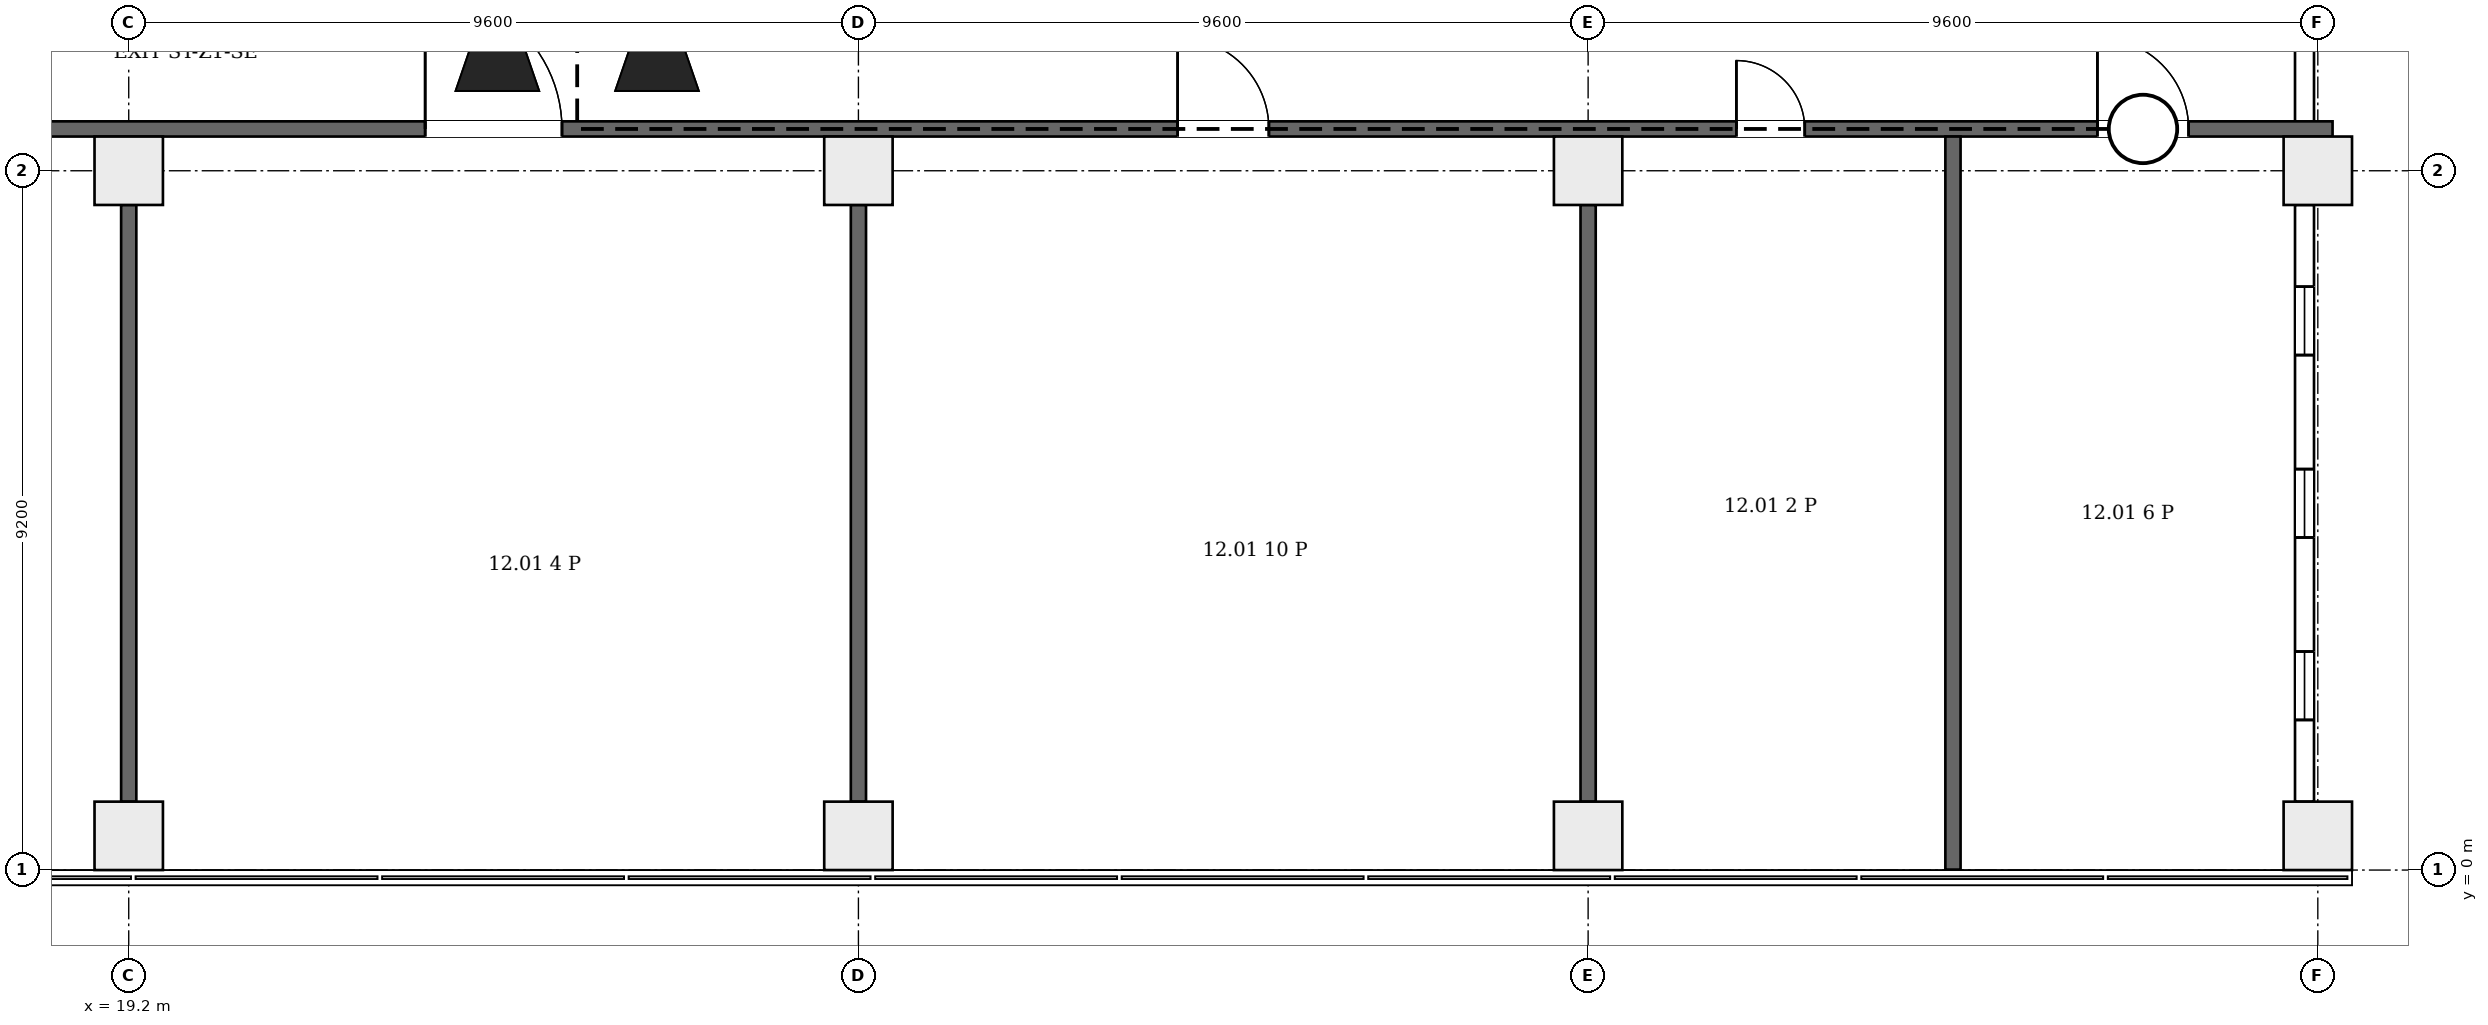
"""IFC4 building model, lengths in metres.
Left out: names, types, materials, properties, quantities, classifications, styles, units other than length and angle.
Written with IfcOpenShell. Run it as: python <this file> out.ifc"""

import sys

from ifc_helpers import new_model, si_unit, direction, frame, frame_2d, origin, origin_2d, place, context, subcontext, project, spatial, rectangle, extrude, element, fill, save


model = new_model("IFC4")
c1 = context("Model", 3, precision=1e-05, world=origin(), true_north=direction((0.0, 1.0)))
c2 = subcontext(c1, "Body", "Model", "MODEL_VIEW")
j1 = project(units=[si_unit("LENGTHUNIT", "METRE"), si_unit("PLANEANGLEUNIT", "RADIAN")], contexts=[c1])
p1 = place(None, origin())
s1 = spatial("IfcSite", under=j1, at=p1, CompositionType="ELEMENT")
p2 = place(p1, origin())
s2 = spatial("IfcBuilding", under=s1, at=p2, CompositionType="ELEMENT")
p3 = place(p2, frame((0.0, 0.0, 61.3)))
s3 = spatial("IfcBuildingStorey", under=s2, at=p3, CompositionType="ELEMENT", Elevation=61.3)
for number, where, z_axis, x_axis in (
    (1, (19.2, 0.45, 0.0), (0.0, 0.0, 1.0), (1.0, 0.0, 0.0)),
    (2, (28.8, 0.45, 0.0), (0.0, 0.0, 1.0), (1.0, 0.0, 0.0)),
    (3, (38.4, 0.45, 0.0), (0.0, 0.0, 1.0), (1.0, 0.0, 0.0)),
    (4, (48.0, 0.45, 0.0), (0.0, 0.0, 1.0), (1.0, 0.0, 0.0)),
    (5, (19.2, 9.2, 0.0), (0.0, 0.0, 1.0), (1.0, 0.0, 0.0)),
    (6, (28.8, 9.2, 0.0), (0.0, 0.0, 1.0), (1.0, 0.0, 0.0)),
    (7, (38.4, 9.2, 0.0), (0.0, 0.0, 1.0), (1.0, 0.0, 0.0)),
    (8, (48.0, 9.2, 0.0), (0.0, 0.0, 1.0), (1.0, 0.0, 0.0)),
):
    element("IfcColumn", number, at=place(p3, frame(where, z_axis=z_axis, x_axis=x_axis)), inside=s3, PredefinedType="COLUMN", context=c2, shape_type="SweptSolid", body=[
        extrude(rectangle(XDim=0.9, YDim=0.9, at=origin_2d()), origin(), (0.0, 0.0, 1.0), 4.2),
    ])
p4 = place(p3, frame((47.825, 0.9, 0.0), z_axis=(0.0, 0.0, 1.0), x_axis=(0.0, 1.0, 0.0)))
e9 = element("IfcWall", 9, at=p4, inside=s3, PredefinedType="ELEMENTEDWALL", context=c2, shape_type="SweptSolid", body=[
    extrude(rectangle(XDim=7.85, YDim=0.25, at=frame_2d((3.925, 0.0))), origin(), (0.0, 0.0, 1.0), 3.3),
])
p5 = place(p4, frame((1.075, 0.0, 0.6)))
e10 = element("IfcOpeningElement", 10, at=p5, cuts=e9, PredefinedType="OPENING", context=c2, shape_type="SweptSolid", body=[
    extrude(rectangle(XDim=0.9, YDim=2.6, at=frame_2d((0.45, 1.3))), frame((0.0, 0.135, 0.0), z_axis=(0.0, -1.0, 0.0), x_axis=(1.0, 0.0, 0.0)), (0.0, 0.0, 1.0), 0.27),
])
p6 = place(p4, frame((3.475, 0.0, 0.6)))
e11 = element("IfcOpeningElement", 11, at=p6, cuts=e9, PredefinedType="OPENING", context=c2, shape_type="SweptSolid", body=[
    extrude(rectangle(XDim=0.9, YDim=2.6, at=frame_2d((0.45, 1.3))), frame((0.0, 0.135, 0.0), z_axis=(0.0, -1.0, 0.0), x_axis=(1.0, 0.0, 0.0)), (0.0, 0.0, 1.0), 0.27),
])
p7 = place(p4, frame((5.875, 0.0, 0.6)))
e12 = element("IfcOpeningElement", 12, at=p7, cuts=e9, PredefinedType="OPENING", context=c2, shape_type="SweptSolid", body=[
    extrude(rectangle(XDim=0.9, YDim=2.6, at=frame_2d((0.45, 1.3))), frame((0.0, 0.135, 0.0), z_axis=(0.0, -1.0, 0.0), x_axis=(1.0, 0.0, 0.0)), (0.0, 0.0, 1.0), 0.27),
])
p8 = place(p3, frame((47.825, 9.65, 0.0), z_axis=(0.0, 0.0, 1.0), x_axis=(0.0, 1.0, 0.0)))
e13 = element("IfcWall", 13, at=p8, inside=s3, PredefinedType="ELEMENTEDWALL", context=c2, shape_type="SweptSolid", body=[
    extrude(rectangle(XDim=8.3, YDim=0.25, at=frame_2d((4.15, 0.0))), origin(), (0.0, 0.0, 1.0), 3.3),
])
p9 = place(p8, frame((1.3, 0.0, 0.6)))
e14 = element("IfcOpeningElement", 14, at=p9, cuts=e13, PredefinedType="OPENING", context=c2, shape_type="SweptSolid", body=[
    extrude(rectangle(XDim=0.9, YDim=2.6, at=frame_2d((0.45, 1.3))), frame((0.0, 0.135, 0.0), z_axis=(0.0, -1.0, 0.0), x_axis=(1.0, 0.0, 0.0)), (0.0, 0.0, 1.0), 0.27),
])
p10 = place(p8, frame((3.7, 0.0, 0.6)))
e15 = element("IfcOpeningElement", 15, at=p10, cuts=e13, PredefinedType="OPENING", context=c2, shape_type="SweptSolid", body=[
    extrude(rectangle(XDim=0.9, YDim=2.6, at=frame_2d((0.45, 1.3))), frame((0.0, 0.135, 0.0), z_axis=(0.0, -1.0, 0.0), x_axis=(1.0, 0.0, 0.0)), (0.0, 0.0, 1.0), 0.27),
])
p11 = place(p8, frame((6.1, 0.0, 0.6)))
e16 = element("IfcOpeningElement", 16, at=p11, cuts=e13, PredefinedType="OPENING", context=c2, shape_type="SweptSolid", body=[
    extrude(rectangle(XDim=0.9, YDim=2.6, at=frame_2d((0.45, 1.3))), frame((0.0, 0.135, 0.0), z_axis=(0.0, -1.0, 0.0), x_axis=(1.0, 0.0, 0.0)), (0.0, 0.0, 1.0), 0.27),
])
p12 = place(p3, frame((4.3, 9.75, 0.0), z_axis=(0.0, 0.0, 1.0), x_axis=(1.0, 0.0, 0.0)))
e17 = element("IfcWall", 17, at=p12, inside=s3, PredefinedType="PARTITIONING", context=c2, shape_type="SweptSolid", body=[
    extrude(rectangle(XDim=43.894, YDim=0.2, at=frame_2d((21.947, 0.0))), origin(), (0.0, 0.0, 1.0), 3.9),
])
p13 = place(p12, frame((18.8, 0.0, 0.0)))
e18 = element("IfcOpeningElement", 18, at=p13, cuts=e17, PredefinedType="OPENING", context=c2, shape_type="SweptSolid", body=[
    extrude(rectangle(XDim=1.8, YDim=2.1, at=frame_2d((0.9, 1.05))), frame((0.0, 0.11, 0.0), z_axis=(0.0, -1.0, 0.0), x_axis=(1.0, 0.0, 0.0)), (0.0, 0.0, 1.0), 0.22),
])
p14 = place(p12, frame((28.7, 0.0, 0.0)))
e19 = element("IfcOpeningElement", 19, at=p14, cuts=e17, PredefinedType="OPENING", context=c2, shape_type="SweptSolid", body=[
    extrude(rectangle(XDim=1.2, YDim=2.1, at=frame_2d((0.6, 1.05))), frame((0.0, 0.11, 0.0), z_axis=(0.0, -1.0, 0.0), x_axis=(1.0, 0.0, 0.0)), (0.0, 0.0, 1.0), 0.22),
])
p15 = place(p12, frame((36.05, 0.0, 0.0)))
e20 = element("IfcOpeningElement", 20, at=p15, cuts=e17, PredefinedType="OPENING", context=c2, shape_type="SweptSolid", body=[
    extrude(rectangle(XDim=0.9, YDim=2.1, at=frame_2d((0.45, 1.05))), frame((0.0, 0.11, 0.0), z_axis=(0.0, -1.0, 0.0), x_axis=(1.0, 0.0, 0.0)), (0.0, 0.0, 1.0), 0.22),
])
p16 = place(p12, frame((40.8, 0.0, 0.0)))
e21 = element("IfcOpeningElement", 21, at=p16, cuts=e17, PredefinedType="OPENING", context=c2, shape_type="SweptSolid", body=[
    extrude(rectangle(XDim=1.2, YDim=2.1, at=frame_2d((0.6, 1.05))), frame((0.0, 0.11, 0.0), z_axis=(0.0, -1.0, 0.0), x_axis=(1.0, 0.0, 0.0)), (0.0, 0.0, 1.0), 0.22),
])
for number, where, z_axis, x_axis in (
    (22, (19.2, 0.9, 0.0), (0.0, 0.0, 1.0), (0.0, 1.0, 0.0)),
    (23, (28.8, 0.9, 0.0), (0.0, 0.0, 1.0), (0.0, 1.0, 0.0)),
    (24, (38.4, 0.9, 0.0), (0.0, 0.0, 1.0), (0.0, 1.0, 0.0)),
):
    element("IfcWall", number, at=place(p3, frame(where, z_axis=z_axis, x_axis=x_axis)), inside=s3, PredefinedType="PARTITIONING", context=c2, shape_type="SweptSolid", body=[
        extrude(rectangle(XDim=7.85, YDim=0.2, at=frame_2d((3.925, 0.0))), origin(), (0.0, 0.0, 1.0), 3.9),
    ])
p17 = place(p3, frame((43.2, 0.006, 0.0), z_axis=(0.0, 0.0, 1.0), x_axis=(0.0, 1.0, 0.0)))
e25 = element("IfcWall", 25, at=p17, inside=s3, PredefinedType="PARTITIONING", context=c2, shape_type="SweptSolid", body=[
    extrude(rectangle(XDim=9.644, YDim=0.2, at=frame_2d((4.822, 0.0))), origin(), (0.0, 0.0, 1.0), 3.9),
])
p18 = place(p5, origin())
e26 = element("IfcWindow", 26, at=p18, inside=s3, PartitioningType="SINGLE_PANEL", PredefinedType="WINDOW", context=c2, shape_type="SweptSolid", body=[
    extrude(rectangle(XDim=0.9, YDim=2.6, at=frame_2d((0.45, 1.3))), frame((0.0, 0.03, 0.0), z_axis=(0.0, -1.0, 0.0), x_axis=(1.0, 0.0, 0.0)), (0.0, 0.0, 1.0), 0.06),
])
fill(e10, e26)
p19 = place(p6, origin())
e27 = element("IfcWindow", 27, at=p19, inside=s3, PartitioningType="SINGLE_PANEL", PredefinedType="WINDOW", context=c2, shape_type="SweptSolid", body=[
    extrude(rectangle(XDim=0.9, YDim=2.6, at=frame_2d((0.45, 1.3))), frame((0.0, 0.03, 0.0), z_axis=(0.0, -1.0, 0.0), x_axis=(1.0, 0.0, 0.0)), (0.0, 0.0, 1.0), 0.06),
])
fill(e11, e27)
p20 = place(p7, origin())
e28 = element("IfcWindow", 28, at=p20, inside=s3, PartitioningType="SINGLE_PANEL", PredefinedType="WINDOW", context=c2, shape_type="SweptSolid", body=[
    extrude(rectangle(XDim=0.9, YDim=2.6, at=frame_2d((0.45, 1.3))), frame((0.0, 0.03, 0.0), z_axis=(0.0, -1.0, 0.0), x_axis=(1.0, 0.0, 0.0)), (0.0, 0.0, 1.0), 0.06),
])
fill(e12, e28)
p21 = place(p13, origin())
e29 = element("IfcDoor", 29, at=p21, inside=s3, OperationType="DOUBLE_DOOR_SINGLE_SWING", PredefinedType="DOOR", context=c2, shape_type="SweptSolid", body=[
    extrude(rectangle(XDim=1.8, YDim=2.1, at=frame_2d((0.9, 1.05))), frame((0.0, 0.025, 0.0), z_axis=(0.0, -1.0, 0.0), x_axis=(1.0, 0.0, 0.0)), (0.0, 0.0, 1.0), 0.05),
])
fill(e18, e29)
p22 = place(p14, origin())
e30 = element("IfcDoor", 30, at=p22, inside=s3, OperationType="SINGLE_SWING_RIGHT", PredefinedType="DOOR", context=c2, shape_type="SweptSolid", body=[
    extrude(rectangle(XDim=1.2, YDim=2.1, at=frame_2d((0.6, 1.05))), frame((0.0, 0.025, 0.0), z_axis=(0.0, -1.0, 0.0), x_axis=(1.0, 0.0, 0.0)), (0.0, 0.0, 1.0), 0.05),
])
fill(e19, e30)
p23 = place(p15, origin())
e31 = element("IfcDoor", 31, at=p23, inside=s3, OperationType="SINGLE_SWING_LEFT", PredefinedType="DOOR", context=c2, shape_type="SweptSolid", body=[
    extrude(rectangle(XDim=0.9, YDim=2.1, at=frame_2d((0.45, 1.05))), frame((0.0, 0.025, 0.0), z_axis=(0.0, -1.0, 0.0), x_axis=(1.0, 0.0, 0.0)), (0.0, 0.0, 1.0), 0.05),
])
fill(e20, e31)
p24 = place(p16, origin())
e32 = element("IfcDoor", 32, at=p24, inside=s3, OperationType="SINGLE_SWING_LEFT", PredefinedType="DOOR", context=c2, shape_type="SweptSolid", body=[
    extrude(rectangle(XDim=1.2, YDim=2.1, at=frame_2d((0.6, 1.05))), frame((0.0, 0.025, 0.0), z_axis=(0.0, -1.0, 0.0), x_axis=(1.0, 0.0, 0.0)), (0.0, 0.0, 1.0), 0.05),
])
fill(e21, e32)
save(model, sys.argv[1])
